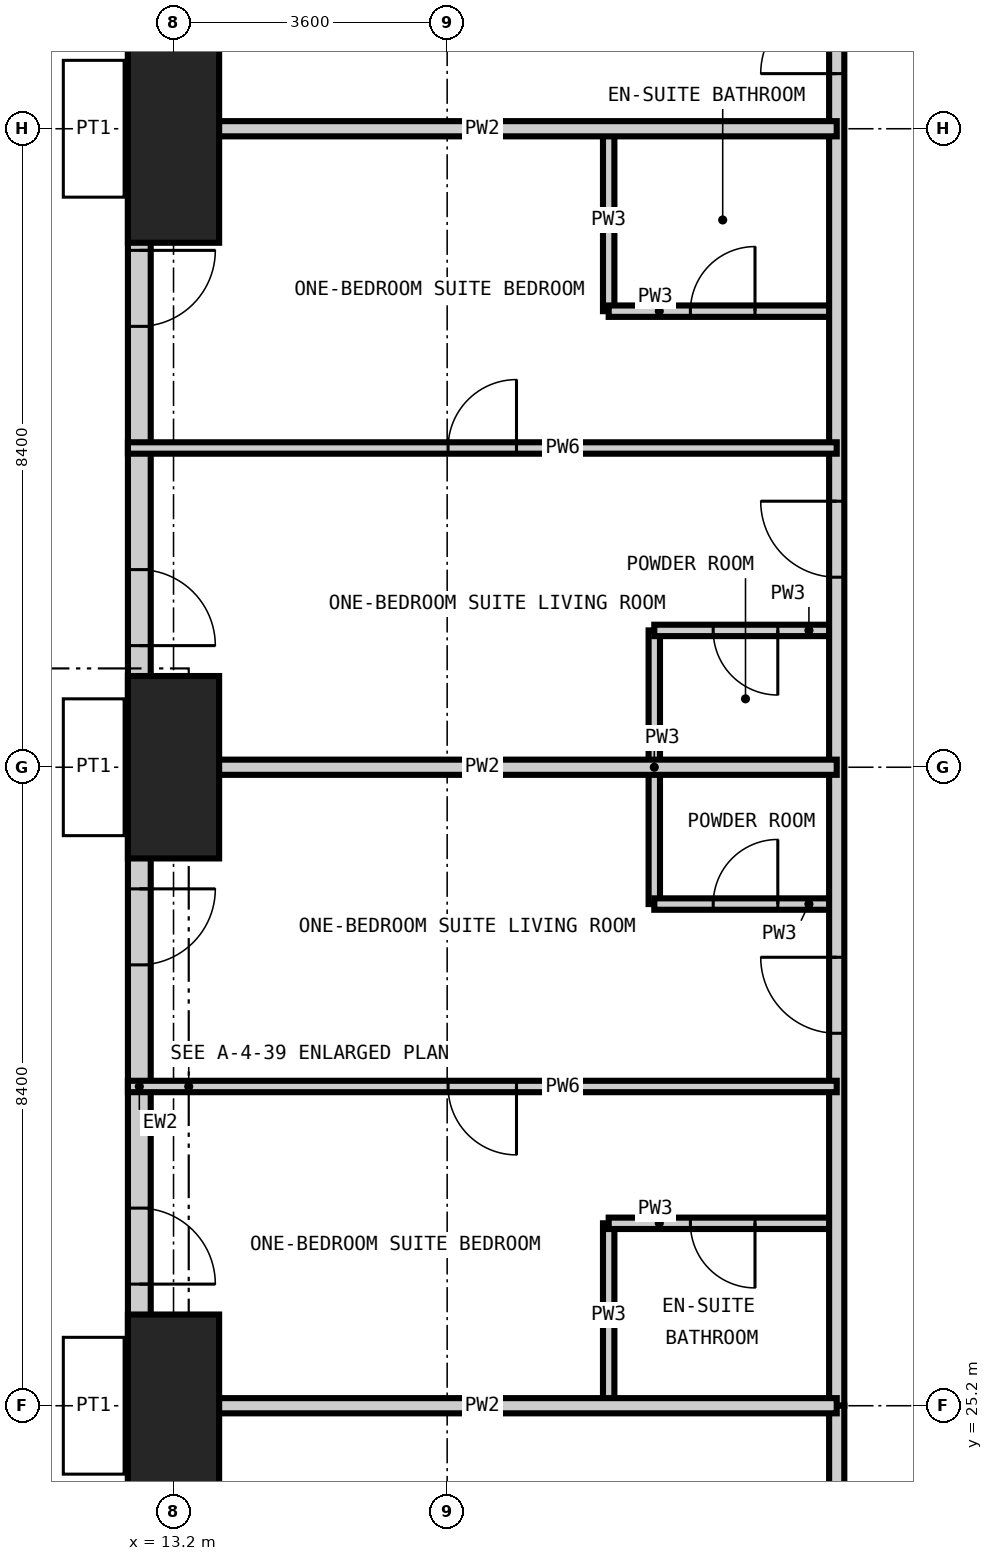
"""IFC4 building model, lengths in metres.
Left out: names, types, materials, properties, quantities, classifications, styles, units other than length and angle.
Written with IfcOpenShell. Run it as: python <this file> out.ifc"""

import sys

from ifc_helpers import new_model, si_unit, direction, frame, frame_2d, origin, origin_2d, place, context, subcontext, project, spatial, rectangle, extrude, element, fill, save


model = new_model("IFC4")
c1 = context("Model", 3, precision=1e-05, world=origin(), true_north=direction((0.0, 1.0)))
c2 = subcontext(c1, "Body", "Model", "MODEL_VIEW")
j1 = project(units=[si_unit("LENGTHUNIT", "METRE"), si_unit("PLANEANGLEUNIT", "RADIAN")], contexts=[c1])
p1 = place(None, origin())
s1 = spatial("IfcSite", under=j1, at=p1, CompositionType="ELEMENT")
p2 = place(p1, origin())
s2 = spatial("IfcBuilding", under=s1, at=p2, CompositionType="ELEMENT")
p3 = place(p2, frame((0.0, 0.0, 225.6)))
s3 = spatial("IfcBuildingStorey", under=s2, at=p3, CompositionType="ELEMENT", Elevation=225.6)
for number, where, z_axis, x_axis in (
    (1, (13.2, 25.2, -0.35), (0.0, 0.0, 1.0), (1.0, 0.0, 0.0)),
    (2, (13.2, 33.6, -0.35), (0.0, 0.0, 1.0), (1.0, 0.0, 0.0)),
):
    element("IfcColumn", number, at=place(p3, frame(where, z_axis=z_axis, x_axis=x_axis)), inside=s3, PredefinedType="COLUMN", context=c2, shape_type="SweptSolid", body=[
        extrude(rectangle(XDim=1.2, YDim=2.4, at=origin_2d()), origin(), (0.0, 0.0, 1.0), 3.9),
    ])
p4 = place(p3, frame((13.2, 42.0, -0.35), z_axis=(0.0, 0.0, 1.0), x_axis=(1.0, 0.0, 0.0)))
e3 = element("IfcColumn", 3, at=p4, inside=s3, PredefinedType="COLUMN", context=c2, shape_type="SweptSolid", body=[
    extrude(rectangle(XDim=1.2, YDim=3.0, at=origin_2d()), origin(), (0.0, 0.0, 1.0), 3.9),
])
p5 = place(p3, frame((12.75, 51.9, 0.0), z_axis=(0.0, 0.0, 1.0), x_axis=(0.0, -1.0, 0.0)))
e4 = element("IfcWall", 4, at=p5, inside=s3, PredefinedType="SOLIDWALL", context=c2, shape_type="SweptSolid", body=[
    extrude(rectangle(XDim=45.0, YDim=0.3, at=frame_2d((22.5, 0.0))), origin(), (0.0, 0.0, 1.0), 3.1),
])
p6 = place(p5, frame((41.25, 0.0, 0.0)))
e5 = element("IfcOpeningElement", 5, at=p6, cuts=e4, PredefinedType="OPENING", context=c2, shape_type="SweptSolid", body=[
    extrude(rectangle(XDim=1.0, YDim=2.4, at=frame_2d((0.5, 1.2))), frame((0.0, 0.16, 0.0), z_axis=(0.0, -1.0, 0.0), x_axis=(1.0, 0.0, 0.0)), (0.0, 0.0, 1.0), 0.32),
])
p7 = place(p5, frame((36.7, 0.0, 0.0)))
e6 = element("IfcOpeningElement", 6, at=p7, cuts=e4, PredefinedType="OPENING", context=c2, shape_type="SweptSolid", body=[
    extrude(rectangle(XDim=1.0, YDim=2.4, at=frame_2d((0.5, 1.2))), frame((0.0, 0.16, 0.0), z_axis=(0.0, -1.0, 0.0), x_axis=(1.0, 0.0, 0.0)), (0.0, 0.0, 1.0), 0.32),
])
p8 = place(p5, frame((30.4, 0.0, 0.0)))
e7 = element("IfcOpeningElement", 7, at=p8, cuts=e4, PredefinedType="OPENING", context=c2, shape_type="SweptSolid", body=[
    extrude(rectangle(XDim=1.0, YDim=2.4, at=frame_2d((0.5, 1.2))), frame((0.0, 0.16, 0.0), z_axis=(0.0, -1.0, 0.0), x_axis=(1.0, 0.0, 0.0)), (0.0, 0.0, 1.0), 0.32),
])
p9 = place(p5, frame((31.7, 0.0, 0.6)))
e8 = element("IfcOpeningElement", 8, at=p9, cuts=e4, PredefinedType="OPENING", context=c2, shape_type="SweptSolid", body=[
    extrude(rectangle(XDim=1.8, YDim=2.1, at=frame_2d((0.9, 1.05))), frame((0.0, 0.16, 0.0), z_axis=(0.0, -1.0, 0.0), x_axis=(1.0, 0.0, 0.0)), (0.0, 0.0, 1.0), 0.32),
])
p10 = place(p5, frame((28.0, 0.0, 0.6)))
e9 = element("IfcOpeningElement", 9, at=p10, cuts=e4, PredefinedType="OPENING", context=c2, shape_type="SweptSolid", body=[
    extrude(rectangle(XDim=1.8, YDim=2.1, at=frame_2d((0.9, 1.05))), frame((0.0, 0.16, 0.0), z_axis=(0.0, -1.0, 0.0), x_axis=(1.0, 0.0, 0.0)), (0.0, 0.0, 1.0), 0.32),
])
p11 = place(p5, frame((24.1, 0.0, 0.0)))
e10 = element("IfcOpeningElement", 10, at=p11, cuts=e4, PredefinedType="OPENING", context=c2, shape_type="SweptSolid", body=[
    extrude(rectangle(XDim=1.0, YDim=2.4, at=frame_2d((0.5, 1.2))), frame((0.0, 0.16, 0.0), z_axis=(0.0, -1.0, 0.0), x_axis=(1.0, 0.0, 0.0)), (0.0, 0.0, 1.0), 0.32),
])
p12 = place(p5, frame((19.9, 0.0, 0.0)))
e11 = element("IfcOpeningElement", 11, at=p12, cuts=e4, PredefinedType="OPENING", context=c2, shape_type="SweptSolid", body=[
    extrude(rectangle(XDim=1.0, YDim=2.4, at=frame_2d((0.5, 1.2))), frame((0.0, 0.16, 0.0), z_axis=(0.0, -1.0, 0.0), x_axis=(1.0, 0.0, 0.0)), (0.0, 0.0, 1.0), 0.32),
])
p13 = place(p5, frame((15.7, 0.0, 0.0)))
e12 = element("IfcOpeningElement", 12, at=p13, cuts=e4, PredefinedType="OPENING", context=c2, shape_type="SweptSolid", body=[
    extrude(rectangle(XDim=1.0, YDim=2.4, at=frame_2d((0.5, 1.2))), frame((0.0, 0.16, 0.0), z_axis=(0.0, -1.0, 0.0), x_axis=(1.0, 0.0, 0.0)), (0.0, 0.0, 1.0), 0.32),
])
p14 = place(p5, frame((11.5, 0.0, 0.0)))
e13 = element("IfcOpeningElement", 13, at=p14, cuts=e4, PredefinedType="OPENING", context=c2, shape_type="SweptSolid", body=[
    extrude(rectangle(XDim=1.0, YDim=2.4, at=frame_2d((0.5, 1.2))), frame((0.0, 0.16, 0.0), z_axis=(0.0, -1.0, 0.0), x_axis=(1.0, 0.0, 0.0)), (0.0, 0.0, 1.0), 0.32),
])
p15 = place(p5, frame((7.3, 0.0, 0.0)))
e14 = element("IfcOpeningElement", 14, at=p15, cuts=e4, PredefinedType="OPENING", context=c2, shape_type="SweptSolid", body=[
    extrude(rectangle(XDim=1.0, YDim=2.4, at=frame_2d((0.5, 1.2))), frame((0.0, 0.16, 0.0), z_axis=(0.0, -1.0, 0.0), x_axis=(1.0, 0.0, 0.0)), (0.0, 0.0, 1.0), 0.32),
])
p16 = place(p5, frame((2.75, 0.0, 0.0)))
e15 = element("IfcOpeningElement", 15, at=p16, cuts=e4, PredefinedType="OPENING", context=c2, shape_type="SweptSolid", body=[
    extrude(rectangle(XDim=1.0, YDim=2.4, at=frame_2d((0.5, 1.2))), frame((0.0, 0.16, 0.0), z_axis=(0.0, -1.0, 0.0), x_axis=(1.0, 0.0, 0.0)), (0.0, 0.0, 1.0), 0.32),
])
p17 = place(p3, frame((18.925, 25.2, 0.0), z_axis=(0.0, 0.0, 1.0), x_axis=(0.0, 1.0, 0.0)))
e16 = element("IfcWall", 16, at=p17, inside=s3, PredefinedType="PARTITIONING", context=c2, shape_type="SweptSolid", body=[
    extrude(rectangle(XDim=2.4, YDim=0.15, at=frame_2d((1.2, 0.0))), origin(), (0.0, 0.0, 1.0), 3.55),
])
p18 = place(p3, frame((18.925, 39.6, 0.0), z_axis=(0.0, 0.0, 1.0), x_axis=(0.0, 1.0, 0.0)))
e17 = element("IfcWall", 17, at=p18, inside=s3, PredefinedType="PARTITIONING", context=c2, shape_type="SweptSolid", body=[
    extrude(rectangle(XDim=2.4, YDim=0.15, at=frame_2d((1.2, 0.0))), origin(), (0.0, 0.0, 1.0), 3.55),
])
p19 = place(p3, frame((19.525, 31.8, 0.0), z_axis=(0.0, 0.0, 1.0), x_axis=(0.0, 1.0, 0.0)))
e18 = element("IfcWall", 18, at=p19, inside=s3, PredefinedType="PARTITIONING", context=c2, shape_type="SweptSolid", body=[
    extrude(rectangle(XDim=3.6, YDim=0.15, at=frame_2d((1.8, 0.0))), origin(), (0.0, 0.0, 1.0), 3.55),
])
p20 = place(p3, frame((18.925, 27.6, 0.0), z_axis=(0.0, 0.0, 1.0), x_axis=(1.0, 0.0, 0.0)))
e19 = element("IfcWall", 19, at=p20, inside=s3, PredefinedType="PARTITIONING", context=c2, shape_type="SweptSolid", body=[
    extrude(rectangle(XDim=3.0, YDim=0.15, at=frame_2d((1.5, 0.0))), origin(), (0.0, 0.0, 1.0), 3.55),
])
p21 = place(p20, frame((1.075, 0.0, 0.0)))
e20 = element("IfcOpeningElement", 20, at=p21, cuts=e19, PredefinedType="OPENING", context=c2, shape_type="SweptSolid", body=[
    extrude(rectangle(XDim=0.85, YDim=2.1, at=frame_2d((0.425, 1.05))), frame((0.0, 0.085, 0.0), z_axis=(0.0, -1.0, 0.0), x_axis=(1.0, 0.0, 0.0)), (0.0, 0.0, 1.0), 0.17),
])
p22 = place(p3, frame((19.525, 31.8, 0.0), z_axis=(0.0, 0.0, 1.0), x_axis=(1.0, 0.0, 0.0)))
e21 = element("IfcWall", 21, at=p22, inside=s3, PredefinedType="PARTITIONING", context=c2, shape_type="SweptSolid", body=[
    extrude(rectangle(XDim=2.4, YDim=0.15, at=frame_2d((1.2, 0.0))), origin(), (0.0, 0.0, 1.0), 3.55),
])
p23 = place(p22, frame((0.775, 0.0, 0.0)))
e22 = element("IfcOpeningElement", 22, at=p23, cuts=e21, PredefinedType="OPENING", context=c2, shape_type="SweptSolid", body=[
    extrude(rectangle(XDim=0.85, YDim=2.1, at=frame_2d((0.425, 1.05))), frame((0.0, 0.085, 0.0), z_axis=(0.0, -1.0, 0.0), x_axis=(1.0, 0.0, 0.0)), (0.0, 0.0, 1.0), 0.17),
])
p24 = place(p3, frame((19.525, 35.4, 0.0), z_axis=(0.0, 0.0, 1.0), x_axis=(1.0, 0.0, 0.0)))
e23 = element("IfcWall", 23, at=p24, inside=s3, PredefinedType="PARTITIONING", context=c2, shape_type="SweptSolid", body=[
    extrude(rectangle(XDim=2.4, YDim=0.15, at=frame_2d((1.2, 0.0))), origin(), (0.0, 0.0, 1.0), 3.55),
])
p25 = place(p24, frame((0.775, 0.0, 0.0)))
e24 = element("IfcOpeningElement", 24, at=p25, cuts=e23, PredefinedType="OPENING", context=c2, shape_type="SweptSolid", body=[
    extrude(rectangle(XDim=0.85, YDim=2.1, at=frame_2d((0.425, 1.05))), frame((0.0, 0.085, 0.0), z_axis=(0.0, -1.0, 0.0), x_axis=(1.0, 0.0, 0.0)), (0.0, 0.0, 1.0), 0.17),
])
p26 = place(p3, frame((18.925, 39.6, 0.0), z_axis=(0.0, 0.0, 1.0), x_axis=(1.0, 0.0, 0.0)))
e25 = element("IfcWall", 25, at=p26, inside=s3, PredefinedType="PARTITIONING", context=c2, shape_type="SweptSolid", body=[
    extrude(rectangle(XDim=3.0, YDim=0.15, at=frame_2d((1.5, 0.0))), origin(), (0.0, 0.0, 1.0), 3.55),
])
p27 = place(p26, frame((1.075, 0.0, 0.0)))
e26 = element("IfcOpeningElement", 26, at=p27, cuts=e25, PredefinedType="OPENING", context=c2, shape_type="SweptSolid", body=[
    extrude(rectangle(XDim=0.85, YDim=2.1, at=frame_2d((0.425, 1.05))), frame((0.0, 0.085, 0.0), z_axis=(0.0, -1.0, 0.0), x_axis=(1.0, 0.0, 0.0)), (0.0, 0.0, 1.0), 0.17),
])
p28 = place(p3, frame((21.925, 25.2, 0.0), z_axis=(0.0, 0.0, 1.0), x_axis=(0.0, 1.0, 0.0)))
e27 = element("IfcWall", 27, at=p28, inside=s3, PredefinedType="PARTITIONING", context=c2, shape_type="SweptSolid", body=[
    extrude(rectangle(XDim=19.25, YDim=0.2, at=frame_2d((9.625, 0.0))), origin(), (0.0, 0.0, 1.0), 3.55),
])
p29 = place(p28, frame((4.9, 0.0, 0.0)))
e28 = element("IfcOpeningElement", 28, at=p29, cuts=e27, PredefinedType="OPENING", context=c2, shape_type="SweptSolid", body=[
    extrude(rectangle(XDim=1.0, YDim=2.2, at=frame_2d((0.5, 1.1))), frame((0.0, 0.11, 0.0), z_axis=(0.0, -1.0, 0.0), x_axis=(1.0, 0.0, 0.0)), (0.0, 0.0, 1.0), 0.22),
])
p30 = place(p28, frame((10.9, 0.0, 0.0)))
e29 = element("IfcOpeningElement", 29, at=p30, cuts=e27, PredefinedType="OPENING", context=c2, shape_type="SweptSolid", body=[
    extrude(rectangle(XDim=1.0, YDim=2.2, at=frame_2d((0.5, 1.1))), frame((0.0, 0.11, 0.0), z_axis=(0.0, -1.0, 0.0), x_axis=(1.0, 0.0, 0.0)), (0.0, 0.0, 1.0), 0.22),
])
p31 = place(p28, frame((17.525, 0.0, 0.0)))
e30 = element("IfcOpeningElement", 30, at=p31, cuts=e27, PredefinedType="OPENING", context=c2, shape_type="SweptSolid", body=[
    extrude(rectangle(XDim=1.0, YDim=2.2, at=frame_2d((0.5, 1.1))), frame((0.0, 0.11, 0.0), z_axis=(0.0, -1.0, 0.0), x_axis=(1.0, 0.0, 0.0)), (0.0, 0.0, 1.0), 0.22),
])
p32 = place(p3, frame((21.925, 25.2, 0.0), z_axis=(0.0, 0.0, 1.0), x_axis=(0.0, -1.0, 0.0)))
e31 = element("IfcWall", 31, at=p32, inside=s3, PredefinedType="PARTITIONING", context=c2, shape_type="SweptSolid", body=[
    extrude(rectangle(XDim=8.4, YDim=0.2, at=frame_2d((4.2, 0.0))), origin(), (0.0, 0.0, 1.0), 3.55),
])
p33 = place(p32, frame((3.3, 0.0, 0.0)))
e32 = element("IfcOpeningElement", 32, at=p33, cuts=e31, PredefinedType="OPENING", context=c2, shape_type="SweptSolid", body=[
    extrude(rectangle(XDim=1.8, YDim=2.4, at=frame_2d((0.9, 1.2))), frame((0.0, 0.11, 0.0), z_axis=(0.0, -1.0, 0.0), x_axis=(1.0, 0.0, 0.0)), (0.0, 0.0, 1.0), 0.22),
])
for number, where, z_axis, x_axis in (
    (33, (12.6, 25.2, 0.0), (0.0, 0.0, 1.0), (1.0, 0.0, 0.0)),
    (34, (12.6, 33.6, 0.0), (0.0, 0.0, 1.0), (1.0, 0.0, 0.0)),
    (35, (12.6, 42.0, 0.0), (0.0, 0.0, 1.0), (1.0, 0.0, 0.0)),
):
    element("IfcWall", number, at=place(p3, frame(where, z_axis=z_axis, x_axis=x_axis)), inside=s3, PredefinedType="PARTITIONING", context=c2, shape_type="SweptSolid", body=[
        extrude(rectangle(XDim=9.325, YDim=0.2, at=frame_2d((4.663, 0.0))), origin(), (0.0, 0.0, 1.0), 3.55),
    ])
p34 = place(p3, frame((12.6, 29.4, 0.0), z_axis=(0.0, 0.0, 1.0), x_axis=(1.0, 0.0, 0.0)))
e36 = element("IfcWall", 36, at=p34, inside=s3, PredefinedType="PARTITIONING", context=c2, shape_type="SweptSolid", body=[
    extrude(rectangle(XDim=9.325, YDim=0.15, at=frame_2d((4.663, 0.0))), origin(), (0.0, 0.0, 1.0), 3.55),
])
p35 = place(p34, frame((4.212, 0.0, 0.0)))
e37 = element("IfcOpeningElement", 37, at=p35, cuts=e36, PredefinedType="OPENING", context=c2, shape_type="SweptSolid", body=[
    extrude(rectangle(XDim=0.9, YDim=2.1, at=frame_2d((0.45, 1.05))), frame((0.0, 0.085, 0.0), z_axis=(0.0, -1.0, 0.0), x_axis=(1.0, 0.0, 0.0)), (0.0, 0.0, 1.0), 0.17),
])
p36 = place(p3, frame((12.6, 37.8, 0.0), z_axis=(0.0, 0.0, 1.0), x_axis=(1.0, 0.0, 0.0)))
e38 = element("IfcWall", 38, at=p36, inside=s3, PredefinedType="PARTITIONING", context=c2, shape_type="SweptSolid", body=[
    extrude(rectangle(XDim=9.325, YDim=0.15, at=frame_2d((4.663, 0.0))), origin(), (0.0, 0.0, 1.0), 3.55),
])
p37 = place(p36, frame((4.212, 0.0, 0.0)))
e39 = element("IfcOpeningElement", 39, at=p37, cuts=e38, PredefinedType="OPENING", context=c2, shape_type="SweptSolid", body=[
    extrude(rectangle(XDim=0.9, YDim=2.1, at=frame_2d((0.45, 1.05))), frame((0.0, 0.085, 0.0), z_axis=(0.0, -1.0, 0.0), x_axis=(1.0, 0.0, 0.0)), (0.0, 0.0, 1.0), 0.17),
])
p38 = place(p11, origin())
e40 = element("IfcDoor", 40, at=p38, inside=s3, OperationType="SINGLE_SWING_RIGHT", PredefinedType="DOOR", context=c2, shape_type="SweptSolid", body=[
    extrude(rectangle(XDim=1.0, YDim=2.4, at=frame_2d((0.5, 1.2))), frame((0.0, 0.025, 0.0), z_axis=(0.0, -1.0, 0.0), x_axis=(1.0, 0.0, 0.0)), (0.0, 0.0, 1.0), 0.05),
])
fill(e10, e40)
p39 = place(p12, origin())
e41 = element("IfcDoor", 41, at=p39, inside=s3, OperationType="SINGLE_SWING_LEFT", PredefinedType="DOOR", context=c2, shape_type="SweptSolid", body=[
    extrude(rectangle(XDim=1.0, YDim=2.4, at=frame_2d((0.5, 1.2))), frame((0.0, 0.025, 0.0), z_axis=(0.0, -1.0, 0.0), x_axis=(1.0, 0.0, 0.0)), (0.0, 0.0, 1.0), 0.05),
])
fill(e11, e41)
p40 = place(p13, origin())
e42 = element("IfcDoor", 42, at=p40, inside=s3, OperationType="SINGLE_SWING_RIGHT", PredefinedType="DOOR", context=c2, shape_type="SweptSolid", body=[
    extrude(rectangle(XDim=1.0, YDim=2.4, at=frame_2d((0.5, 1.2))), frame((0.0, 0.025, 0.0), z_axis=(0.0, -1.0, 0.0), x_axis=(1.0, 0.0, 0.0)), (0.0, 0.0, 1.0), 0.05),
])
fill(e12, e42)
p41 = place(p14, origin())
e43 = element("IfcDoor", 43, at=p41, inside=s3, OperationType="SINGLE_SWING_LEFT", PredefinedType="DOOR", context=c2, shape_type="SweptSolid", body=[
    extrude(rectangle(XDim=1.0, YDim=2.4, at=frame_2d((0.5, 1.2))), frame((0.0, 0.025, 0.0), z_axis=(0.0, -1.0, 0.0), x_axis=(1.0, 0.0, 0.0)), (0.0, 0.0, 1.0), 0.05),
])
fill(e13, e43)
p42 = place(p29, origin())
e44 = element("IfcDoor", 44, at=p42, inside=s3, OperationType="SINGLE_SWING_RIGHT", PredefinedType="DOOR", context=c2, shape_type="SweptSolid", body=[
    extrude(rectangle(XDim=1.0, YDim=2.2, at=frame_2d((0.5, 1.1))), frame((0.0, 0.025, 0.0), z_axis=(0.0, -1.0, 0.0), x_axis=(1.0, 0.0, 0.0)), (0.0, 0.0, 1.0), 0.05),
])
fill(e28, e44)
p43 = place(p23, origin())
e45 = element("IfcDoor", 45, at=p43, inside=s3, OperationType="SINGLE_SWING_RIGHT", PredefinedType="DOOR", context=c2, shape_type="SweptSolid", body=[
    extrude(rectangle(XDim=0.85, YDim=2.1, at=frame_2d((0.425, 1.05))), frame((0.0, 0.025, 0.0), z_axis=(0.0, -1.0, 0.0), x_axis=(1.0, 0.0, 0.0)), (0.0, 0.0, 1.0), 0.05),
])
fill(e22, e45)
p44 = place(p35, frame((0.9, 0.0, 0.0), z_axis=(0.0, 0.0, 1.0), x_axis=(-1.0, 0.0, 0.0)))
e46 = element("IfcDoor", 46, at=p44, inside=s3, OperationType="SINGLE_SWING_LEFT", PredefinedType="DOOR", context=c2, shape_type="SweptSolid", body=[
    extrude(rectangle(XDim=0.9, YDim=2.1, at=frame_2d((0.45, 1.05))), frame((0.0, 0.025, 0.0), z_axis=(0.0, -1.0, 0.0), x_axis=(1.0, 0.0, 0.0)), (0.0, 0.0, 1.0), 0.05),
])
fill(e37, e46)
p45 = place(p21, frame((0.85, 0.0, 0.0), z_axis=(0.0, 0.0, 1.0), x_axis=(-1.0, 0.0, 0.0)))
e47 = element("IfcDoor", 47, at=p45, inside=s3, OperationType="SINGLE_SWING_LEFT", PredefinedType="DOOR", context=c2, shape_type="SweptSolid", body=[
    extrude(rectangle(XDim=0.85, YDim=2.1, at=frame_2d((0.425, 1.05))), frame((0.0, 0.025, 0.0), z_axis=(0.0, -1.0, 0.0), x_axis=(1.0, 0.0, 0.0)), (0.0, 0.0, 1.0), 0.05),
])
fill(e20, e47)
p46 = place(p30, origin())
e48 = element("IfcDoor", 48, at=p46, inside=s3, OperationType="SINGLE_SWING_RIGHT", PredefinedType="DOOR", context=c2, shape_type="SweptSolid", body=[
    extrude(rectangle(XDim=1.0, YDim=2.2, at=frame_2d((0.5, 1.1))), frame((0.0, 0.025, 0.0), z_axis=(0.0, -1.0, 0.0), x_axis=(1.0, 0.0, 0.0)), (0.0, 0.0, 1.0), 0.05),
])
fill(e29, e48)
p47 = place(p25, frame((0.85, 0.0, 0.0), z_axis=(0.0, 0.0, 1.0), x_axis=(-1.0, 0.0, 0.0)))
e49 = element("IfcDoor", 49, at=p47, inside=s3, OperationType="SINGLE_SWING_LEFT", PredefinedType="DOOR", context=c2, shape_type="SweptSolid", body=[
    extrude(rectangle(XDim=0.85, YDim=2.1, at=frame_2d((0.425, 1.05))), frame((0.0, 0.025, 0.0), z_axis=(0.0, -1.0, 0.0), x_axis=(1.0, 0.0, 0.0)), (0.0, 0.0, 1.0), 0.05),
])
fill(e24, e49)
p48 = place(p37, origin())
e50 = element("IfcDoor", 50, at=p48, inside=s3, OperationType="SINGLE_SWING_RIGHT", PredefinedType="DOOR", context=c2, shape_type="SweptSolid", body=[
    extrude(rectangle(XDim=0.9, YDim=2.1, at=frame_2d((0.45, 1.05))), frame((0.0, 0.025, 0.0), z_axis=(0.0, -1.0, 0.0), x_axis=(1.0, 0.0, 0.0)), (0.0, 0.0, 1.0), 0.05),
])
fill(e39, e50)
p49 = place(p27, origin())
e51 = element("IfcDoor", 51, at=p49, inside=s3, OperationType="SINGLE_SWING_RIGHT", PredefinedType="DOOR", context=c2, shape_type="SweptSolid", body=[
    extrude(rectangle(XDim=0.85, YDim=2.1, at=frame_2d((0.425, 1.05))), frame((0.0, 0.025, 0.0), z_axis=(0.0, -1.0, 0.0), x_axis=(1.0, 0.0, 0.0)), (0.0, 0.0, 1.0), 0.05),
])
fill(e26, e51)
p50 = place(p31, origin())
e52 = element("IfcDoor", 52, at=p50, inside=s3, OperationType="SINGLE_SWING_LEFT", PredefinedType="DOOR", context=c2, shape_type="SweptSolid", body=[
    extrude(rectangle(XDim=1.0, YDim=2.2, at=frame_2d((0.5, 1.1))), frame((0.0, 0.025, 0.0), z_axis=(0.0, -1.0, 0.0), x_axis=(1.0, 0.0, 0.0)), (0.0, 0.0, 1.0), 0.05),
])
fill(e30, e52)
save(model, sys.argv[1])
